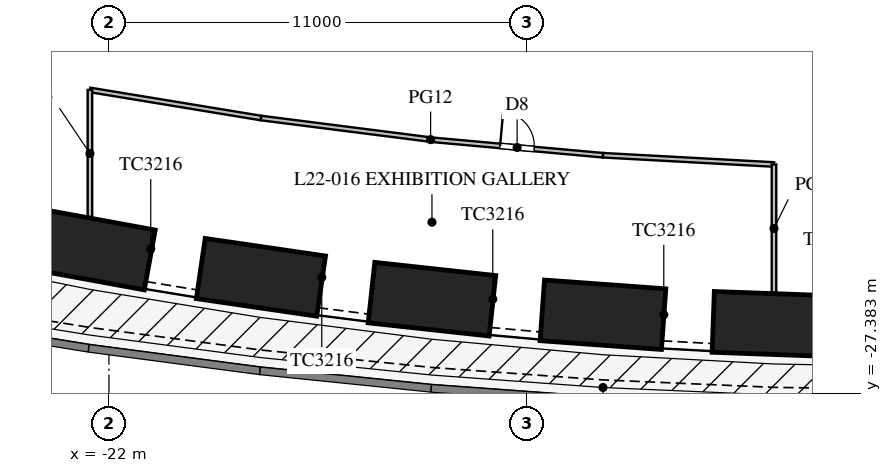
"""IFC4 building model, lengths in metres.
Left out: names, types, materials, properties, quantities, classifications, styles, units other than length and angle.
Written with IfcOpenShell. Run it as: python <this file> out.ifc"""

import sys

from ifc_helpers import new_model, si_unit, direction, frame, frame_2d, origin, origin_2d, place, context, subcontext, project, spatial, rectangle, extrude, element, fill, save


model = new_model("IFC4")
c1 = context("Model", 3, precision=1e-05, world=origin(), true_north=direction((0.0, 1.0)))
c2 = subcontext(c1, "Body", "Model", "MODEL_VIEW")
j1 = project(units=[si_unit("LENGTHUNIT", "METRE"), si_unit("PLANEANGLEUNIT", "RADIAN")], contexts=[c1])
p1 = place(None, origin())
s1 = spatial("IfcSite", under=j1, at=p1, CompositionType="ELEMENT")
p2 = place(p1, origin())
s2 = spatial("IfcBuilding", under=s1, at=p2, CompositionType="ELEMENT")
p3 = place(p2, frame((0.0, 0.0, 98.1)))
s3 = spatial("IfcBuildingStorey", under=s2, at=p3, CompositionType="ELEMENT", Elevation=98.1)
for number, where, z_axis, x_axis in (
    (1, (-22.5, -23.593, 0.0), (0.0, 0.0, 1.0), (0.984, -0.18, 0.0)),
    (2, (-18.0, -24.337, 0.0), (0.0, 0.0, 1.0), (0.99, -0.144, 0.0)),
    (3, (-13.5, -24.913, 0.0), (0.0, 0.0, 1.0), (0.994, -0.108, 0.0)),
    (4, (-9.0, -25.323, 0.0), (0.0, 0.0, 1.0), (0.997, -0.072, 0.0)),
    (5, (-4.5, -25.568, 0.0), (0.0, 0.0, 1.0), (0.999, -0.036, 0.0)),
):
    element("IfcColumn", number, at=place(p3, frame(where, z_axis=z_axis, x_axis=x_axis)), inside=s3, PredefinedType="COLUMN", context=c2, shape_type="SweptSolid", body=[
        extrude(rectangle(XDim=3.2, YDim=1.6, at=origin_2d()), origin(), (0.0, 0.0, 1.0), 5.0),
    ])
p4 = place(p3, frame((-27.0, -25.255, 0.0), z_axis=(0.0, 0.0, 1.0), x_axis=(0.987181300889, -0.159602879593, 0.0)))
e6 = element("IfcWall", 6, at=p4, inside=s3, PredefinedType="PARAPET", context=c2, shape_type="SweptSolid", body=[
    extrude(rectangle(XDim=4.558, YDim=0.25, at=frame_2d((2.279, 0.0))), origin(), (0.0, 0.0, 1.0), 1.1),
])
p5 = place(p3, frame((-22.5, -25.983, 0.0), z_axis=(0.0, 0.0, 1.0), x_axis=(0.991435244698, -0.130599217346, 0.0)))
e7 = element("IfcWall", 7, at=p5, inside=s3, PredefinedType="PARAPET", context=c2, shape_type="SweptSolid", body=[
    extrude(rectangle(XDim=4.539, YDim=0.25, at=frame_2d((2.27, 0.0))), origin(), (0.0, 0.0, 1.0), 1.1),
])
p6 = place(p3, frame((-18.0, -26.576, 0.0), z_axis=(0.0, 0.0, 1.0), x_axis=(0.994833141332, -0.101523499286, 0.0)))
e8 = element("IfcWall", 8, at=p6, inside=s3, PredefinedType="PARAPET", context=c2, shape_type="SweptSolid", body=[
    extrude(rectangle(XDim=4.523, YDim=0.25, at=frame_2d((2.262, 0.0))), origin(), (0.0, 0.0, 1.0), 1.1),
])
p7 = place(p3, frame((-13.5, -27.035, 0.0), z_axis=(0.0, 0.0, 1.0), x_axis=(0.997363894896, -0.072562119306, 0.0)))
e9 = element("IfcWall", 9, at=p7, inside=s3, PredefinedType="PARAPET", context=c2, shape_type="SweptSolid", body=[
    extrude(rectangle(XDim=4.512, YDim=0.25, at=frame_2d((2.256, 0.0))), origin(), (0.0, 0.0, 1.0), 1.1),
])
p8 = place(p3, frame((-9.0, -27.362, 0.0), z_axis=(0.0, 0.0, 1.0), x_axis=(0.999052370647, -0.043524254212, 0.0)))
e10 = element("IfcWall", 10, at=p8, inside=s3, PredefinedType="PARAPET", context=c2, shape_type="SweptSolid", body=[
    extrude(rectangle(XDim=4.504, YDim=0.25, at=frame_2d((2.252, 0.0))), origin(), (0.0, 0.0, 1.0), 1.1),
])
p9 = place(p3, frame((-13.5, -20.718, 0.0), z_axis=(0.0, 0.0, 1.0), x_axis=(0.995930325215, -0.090126507295, 0.0)))
e11 = element("IfcWall", 11, at=p9, inside=s3, PredefinedType="PARTITIONING", context=c2, shape_type="SweptSolid", body=[
    extrude(rectangle(XDim=4.518, YDim=0.12, at=frame_2d((2.259, 0.0))), origin(), (0.0, 0.0, 1.0), 3.6),
])
p10 = place(p9, frame((1.8, 0.0, 0.0)))
e12 = element("IfcOpeningElement", 12, at=p10, cuts=e11, PredefinedType="OPENING", context=c2, shape_type="SweptSolid", body=[
    extrude(rectangle(XDim=0.9, YDim=2.1, at=frame_2d((0.45, 1.05))), frame((0.0, 0.07, 0.0), z_axis=(0.0, -1.0, 0.0), x_axis=(1.0, 0.0, 0.0)), (0.0, 0.0, 1.0), 0.14),
])
p11 = place(p3, frame((-18.0, -20.146, 0.0), z_axis=(0.0, 0.0, 1.0), x_axis=(0.992010652594, -0.12615413247, 0.0)))
e13 = element("IfcWall", 13, at=p11, inside=s3, PredefinedType="PARTITIONING", context=c2, shape_type="SweptSolid", body=[
    extrude(rectangle(XDim=4.536, YDim=0.12, at=frame_2d((2.268, 0.0))), origin(), (0.0, 0.0, 1.0), 3.6),
])
p12 = place(p3, frame((-22.5, -19.406, 0.0), z_axis=(0.0, 0.0, 1.0), x_axis=(0.986764681833, -0.162158757664, 0.0)))
e14 = element("IfcWall", 14, at=p12, inside=s3, PredefinedType="PARTITIONING", context=c2, shape_type="SweptSolid", body=[
    extrude(rectangle(XDim=4.56, YDim=0.12, at=frame_2d((2.28, 0.0))), origin(), (0.0, 0.0, 1.0), 3.6),
])
p13 = place(p3, frame((-9.0, -21.125, 0.0), z_axis=(0.0, 0.0, 1.0), x_axis=(0.998537376538, -0.054065771581, 0.0)))
e15 = element("IfcWall", 15, at=p13, inside=s3, PredefinedType="PARTITIONING", context=c2, shape_type="SweptSolid", body=[
    extrude(rectangle(XDim=4.507, YDim=0.12, at=frame_2d((2.253, 0.0))), origin(), (0.0, 0.0, 1.0), 3.6),
])
p14 = place(p3, frame((-22.5, -19.406, 0.0), z_axis=(0.0, 0.0, 1.0), x_axis=(0.0, -1.0, 0.0)))
e16 = element("IfcWall", 16, at=p14, inside=s3, PredefinedType="PARTITIONING", context=c2, shape_type="SweptSolid", body=[
    extrude(rectangle(XDim=3.343, YDim=0.12, at=frame_2d((1.671, 0.0))), origin(), (0.0, 0.0, 1.0), 3.4),
])
p15 = place(p3, frame((-4.5, -21.369, 0.0), z_axis=(0.0, 0.0, 1.0), x_axis=(0.0, -1.0, 0.0)))
e17 = element("IfcWall", 17, at=p15, inside=s3, PredefinedType="PARTITIONING", context=c2, shape_type="SweptSolid", body=[
    extrude(rectangle(XDim=3.369, YDim=0.12, at=frame_2d((1.685, 0.0))), origin(), (0.0, 0.0, 1.0), 3.2),
])
p16 = place(p10, origin())
e18 = element("IfcDoor", 18, at=p16, inside=s3, OperationType="SINGLE_SWING_LEFT", PredefinedType="DOOR", context=c2, shape_type="SweptSolid", body=[
    extrude(rectangle(XDim=0.9, YDim=2.1, at=frame_2d((0.45, 1.05))), frame((0.0, 0.025, 0.0), z_axis=(0.0, -1.0, 0.0), x_axis=(1.0, 0.0, 0.0)), (0.0, 0.0, 1.0), 0.05),
])
fill(e12, e18)
save(model, sys.argv[1])
